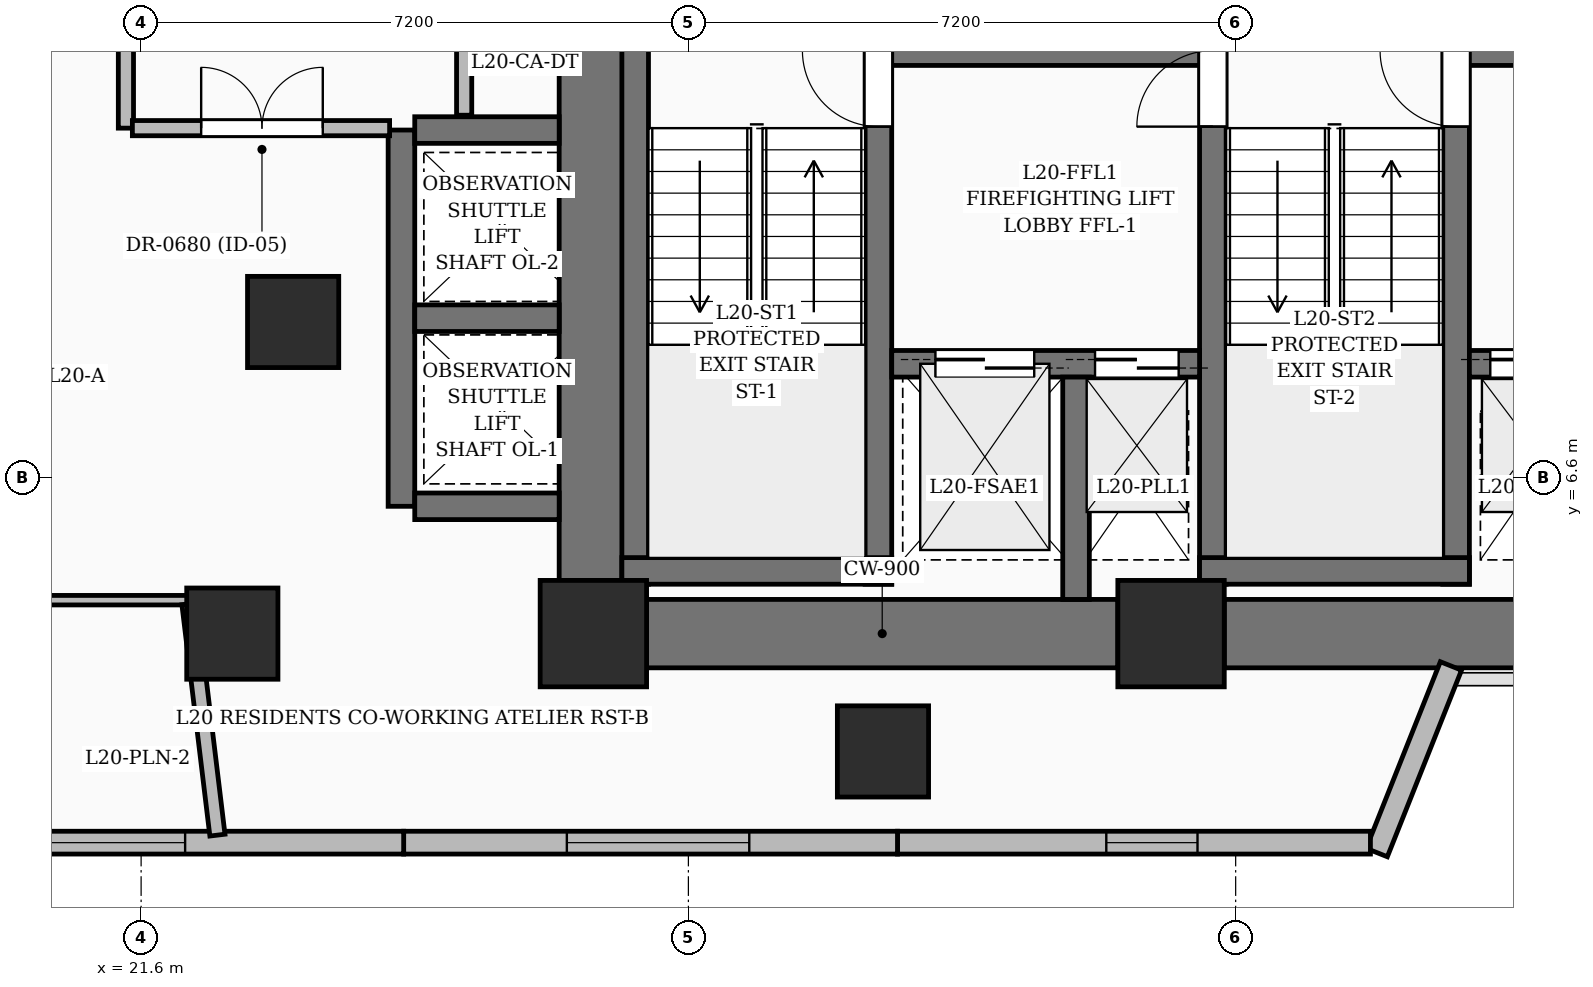
"""IFC4 building model, lengths in metres.
Left out: names, types, materials, properties, quantities, classifications, styles, units other than length and angle.
Written with IfcOpenShell. Run it as: python <this file> out.ifc"""

import sys

from ifc_helpers import new_model, si_unit, direction, frame, frame_2d, origin, origin_2d, place, context, subcontext, project, spatial, rectangle, extrude, element, fill, save


model = new_model("IFC4")
c1 = context("Model", 3, precision=1e-05, world=origin(), true_north=direction((0.0, 1.0)))
c2 = subcontext(c1, "Body", "Model", "MODEL_VIEW")
j1 = project(units=[si_unit("LENGTHUNIT", "METRE"), si_unit("PLANEANGLEUNIT", "RADIAN")], contexts=[c1])
p1 = place(None, origin())
s1 = spatial("IfcSite", under=j1, at=p1, CompositionType="ELEMENT")
p2 = place(p1, origin())
s2 = spatial("IfcBuilding", under=s1, at=p2, CompositionType="ELEMENT")
p3 = place(p2, frame((0.0, 0.0, 82.2)))
s3 = spatial("IfcBuildingStorey", under=s2, at=p3, CompositionType="ELEMENT", Elevation=82.2)
for number, where, z_axis, x_axis in (
    (1, (27.55, 4.55, 0.0), (0.0, 0.0, 1.0), (1.0, 0.0, 0.0)),
    (2, (35.15, 4.55, 0.0), (0.0, 0.0, 1.0), (1.0, 0.0, 0.0)),
):
    element("IfcColumn", number, at=place(p3, frame(where, z_axis=z_axis, x_axis=x_axis)), inside=s3, PredefinedType="COLUMN", context=c2, shape_type="SweptSolid", body=[
        extrude(rectangle(XDim=1.4, YDim=1.4, at=origin_2d()), origin(), (0.0, 0.0, 1.0), 3.6),
    ])
for number, where, z_axis, x_axis in (
    (3, (22.8, 4.55, 0.0), (0.0, 0.0, 1.0), (1.0, 0.0, 0.0)),
    (4, (23.6, 8.65, 0.0), (0.0, 0.0, 1.0), (1.0, 0.0, 0.0)),
):
    element("IfcColumn", number, at=place(p3, frame(where, z_axis=z_axis, x_axis=x_axis)), inside=s3, PredefinedType="COLUMN", context=c2, shape_type="SweptSolid", body=[
        extrude(rectangle(XDim=1.2, YDim=1.2, at=origin_2d()), origin(), (0.0, 0.0, 1.0), 3.6),
    ])
p4 = place(p3, frame((28.25, 4.55, 0.0), z_axis=(0.0, 0.0, 1.0), x_axis=(1.0, 0.0, 0.0)))
e5 = element("IfcWall", 5, at=p4, inside=s3, PredefinedType="SHEAR", context=c2, shape_type="SweptSolid", body=[
    extrude(rectangle(XDim=6.2, YDim=0.9, at=frame_2d((3.1, 0.0))), origin(), (0.0, 0.0, 1.0), 3.6),
])
p5 = place(p3, frame((35.85, 4.55, 0.0), z_axis=(0.0, 0.0, 1.0), x_axis=(1.0, 0.0, 0.0)))
e6 = element("IfcWall", 6, at=p5, inside=s3, PredefinedType="SHEAR", context=c2, shape_type="SweptSolid", body=[
    extrude(rectangle(XDim=10.5, YDim=0.9, at=frame_2d((5.25, 0.0))), origin(), (0.0, 0.0, 1.0), 3.6),
])
p6 = place(p3, frame((27.55, 5.25, 0.0), z_axis=(0.0, 0.0, 1.0), x_axis=(0.0, 1.0, 0.0)))
e7 = element("IfcWall", 7, at=p6, inside=s3, PredefinedType="SHEAR", context=c2, shape_type="SweptSolid", body=[
    extrude(rectangle(XDim=8.8, YDim=0.9, at=frame_2d((4.4, 0.0))), origin(), (0.0, 0.0, 1.0), 3.6),
])
p7 = place(p3, frame((28.1, 5.2, 0.0), z_axis=(0.0, 0.0, 1.0), x_axis=(0.0, 1.0, 0.0)))
e8 = element("IfcWall", 8, at=p7, inside=s3, PredefinedType="SOLIDWALL", context=c2, shape_type="SweptSolid", body=[
    extrude(rectangle(XDim=9.1, YDim=0.35, at=frame_2d((4.55, 0.0))), origin(), (0.0, 0.0, 1.0), 3.6),
])
p8 = place(p3, frame((31.3, 5.2, 0.0), z_axis=(0.0, 0.0, 1.0), x_axis=(0.0, 1.0, 0.0)))
e9 = element("IfcWall", 9, at=p8, inside=s3, PredefinedType="SOLIDWALL", context=c2, shape_type="SweptSolid", body=[
    extrude(rectangle(XDim=9.1, YDim=0.35, at=frame_2d((4.55, 0.0))), origin(), (0.0, 0.0, 1.0), 3.6),
])
p9 = place(p8, frame((6.02, 0.0, 0.0)))
e10 = element("IfcOpeningElement", 10, at=p9, cuts=e9, PredefinedType="OPENING", context=c2, shape_type="SweptSolid", body=[
    extrude(rectangle(XDim=1.0, YDim=2.15, at=frame_2d((0.5, 1.075))), frame((0.0, 0.185, 0.0), z_axis=(0.0, -1.0, 0.0), x_axis=(1.0, 0.0, 0.0)), (0.0, 0.0, 1.0), 0.37),
])
p10 = place(p3, frame((27.925, 5.375, 0.0), z_axis=(0.0, 0.0, 1.0), x_axis=(1.0, 0.0, 0.0)))
e11 = element("IfcWall", 11, at=p10, inside=s3, PredefinedType="SOLIDWALL", context=c2, shape_type="SweptSolid", body=[
    extrude(rectangle(XDim=3.55, YDim=0.35, at=frame_2d((1.775, 0.0))), origin(), (0.0, 0.0, 1.0), 3.6),
])
p11 = place(p3, frame((35.7, 5.2, 0.0), z_axis=(0.0, 0.0, 1.0), x_axis=(0.0, 1.0, 0.0)))
e12 = element("IfcWall", 12, at=p11, inside=s3, PredefinedType="SOLIDWALL", context=c2, shape_type="SweptSolid", body=[
    extrude(rectangle(XDim=9.1, YDim=0.35, at=frame_2d((4.55, 0.0))), origin(), (0.0, 0.0, 1.0), 3.6),
])
p12 = place(p11, frame((6.02, 0.0, 0.0)))
e13 = element("IfcOpeningElement", 13, at=p12, cuts=e12, PredefinedType="OPENING", context=c2, shape_type="SweptSolid", body=[
    extrude(rectangle(XDim=1.0, YDim=2.15, at=frame_2d((0.5, 1.075))), frame((0.0, 0.185, 0.0), z_axis=(0.0, -1.0, 0.0), x_axis=(1.0, 0.0, 0.0)), (0.0, 0.0, 1.0), 0.37),
])
p13 = place(p3, frame((38.9, 5.2, 0.0), z_axis=(0.0, 0.0, 1.0), x_axis=(0.0, 1.0, 0.0)))
e14 = element("IfcWall", 14, at=p13, inside=s3, PredefinedType="SOLIDWALL", context=c2, shape_type="SweptSolid", body=[
    extrude(rectangle(XDim=9.1, YDim=0.35, at=frame_2d((4.55, 0.0))), origin(), (0.0, 0.0, 1.0), 3.6),
])
p14 = place(p13, frame((6.02, 0.0, 0.0)))
e15 = element("IfcOpeningElement", 15, at=p14, cuts=e14, PredefinedType="OPENING", context=c2, shape_type="SweptSolid", body=[
    extrude(rectangle(XDim=1.0, YDim=2.15, at=frame_2d((0.5, 1.075))), frame((0.0, 0.185, 0.0), z_axis=(0.0, -1.0, 0.0), x_axis=(1.0, 0.0, 0.0)), (0.0, 0.0, 1.0), 0.37),
])
p15 = place(p3, frame((35.525, 5.375, 0.0), z_axis=(0.0, 0.0, 1.0), x_axis=(1.0, 0.0, 0.0)))
e16 = element("IfcWall", 16, at=p15, inside=s3, PredefinedType="SOLIDWALL", context=c2, shape_type="SweptSolid", body=[
    extrude(rectangle(XDim=3.55, YDim=0.35, at=frame_2d((1.775, 0.0))), origin(), (0.0, 0.0, 1.0), 3.6),
])
p16 = place(p3, frame((31.475, 8.1, 0.0), z_axis=(0.0, 0.0, 1.0), x_axis=(1.0, 0.0, 0.0)))
e17 = element("IfcWall", 17, at=p16, inside=s3, PredefinedType="SOLIDWALL", context=c2, shape_type="SweptSolid", body=[
    extrude(rectangle(XDim=4.05, YDim=0.35, at=frame_2d((2.025, 0.0))), origin(), (0.0, 0.0, 1.0), 3.6),
])
p17 = place(p16, frame((0.575, 0.0, 0.0)))
e18 = element("IfcOpeningElement", 18, at=p17, cuts=e17, PredefinedType="OPENING", context=c2, shape_type="SweptSolid", body=[
    extrude(rectangle(XDim=1.3, YDim=2.25, at=frame_2d((0.65, 1.125))), frame((0.0, 0.185, 0.0), z_axis=(0.0, -1.0, 0.0), x_axis=(1.0, 0.0, 0.0)), (0.0, 0.0, 1.0), 0.37),
])
p18 = place(p16, frame((2.675, 0.0, 0.0)))
e19 = element("IfcOpeningElement", 19, at=p18, cuts=e17, PredefinedType="OPENING", context=c2, shape_type="SweptSolid", body=[
    extrude(rectangle(XDim=1.1, YDim=2.2, at=frame_2d((0.55, 1.1))), frame((0.0, 0.185, 0.0), z_axis=(0.0, -1.0, 0.0), x_axis=(1.0, 0.0, 0.0)), (0.0, 0.0, 1.0), 0.37),
])
p19 = place(p3, frame((39.075, 8.1, 0.0), z_axis=(0.0, 0.0, 1.0), x_axis=(1.0, 0.0, 0.0)))
e20 = element("IfcWall", 20, at=p19, inside=s3, PredefinedType="SOLIDWALL", context=c2, shape_type="SweptSolid", body=[
    extrude(rectangle(XDim=4.05, YDim=0.35, at=frame_2d((2.025, 0.0))), origin(), (0.0, 0.0, 1.0), 3.6),
])
p20 = place(p19, frame((2.175, 0.0, 0.0)))
e21 = element("IfcOpeningElement", 21, at=p20, cuts=e20, PredefinedType="OPENING", context=c2, shape_type="SweptSolid", body=[
    extrude(rectangle(XDim=1.3, YDim=2.25, at=frame_2d((0.65, 1.125))), frame((0.0, 0.185, 0.0), z_axis=(0.0, -1.0, 0.0), x_axis=(1.0, 0.0, 0.0)), (0.0, 0.0, 1.0), 0.37),
])
p21 = place(p19, frame((0.275, 0.0, 0.0)))
e22 = element("IfcOpeningElement", 22, at=p21, cuts=e20, PredefinedType="OPENING", context=c2, shape_type="SweptSolid", body=[
    extrude(rectangle(XDim=1.1, YDim=2.2, at=frame_2d((0.55, 1.1))), frame((0.0, 0.185, 0.0), z_axis=(0.0, -1.0, 0.0), x_axis=(1.0, 0.0, 0.0)), (0.0, 0.0, 1.0), 0.37),
])
p22 = place(p3, frame((33.9, 5.0, 0.0), z_axis=(0.0, 0.0, 1.0), x_axis=(0.0, 1.0, 0.0)))
e23 = element("IfcWall", 23, at=p22, inside=s3, PredefinedType="SOLIDWALL", context=c2, shape_type="SweptSolid", body=[
    extrude(rectangle(XDim=2.925, YDim=0.35, at=frame_2d((1.462, 0.0))), origin(), (0.0, 0.0, 1.0), 3.6),
])
p23 = place(p3, frame((31.475, 12.2, 0.0), z_axis=(0.0, 0.0, 1.0), x_axis=(1.0, 0.0, 0.0)))
e24 = element("IfcWall", 24, at=p23, inside=s3, PredefinedType="SOLIDWALL", context=c2, shape_type="SweptSolid", body=[
    extrude(rectangle(XDim=4.05, YDim=0.35, at=frame_2d((2.025, 0.0))), origin(), (0.0, 0.0, 1.0), 3.6),
])
p24 = place(p3, frame((39.075, 12.2, 0.0), z_axis=(0.0, 0.0, 1.0), x_axis=(1.0, 0.0, 0.0)))
e25 = element("IfcWall", 25, at=p24, inside=s3, PredefinedType="SOLIDWALL", context=c2, shape_type="SweptSolid", body=[
    extrude(rectangle(XDim=4.05, YDim=0.35, at=frame_2d((2.025, 0.0))), origin(), (0.0, 0.0, 1.0), 3.6),
])
p25 = place(p3, frame((25.025, 6.225, 0.0), z_axis=(0.0, 0.0, 1.0), x_axis=(0.0, 1.0, 0.0)))
e26 = element("IfcWall", 26, at=p25, inside=s3, PredefinedType="SOLIDWALL", context=c2, shape_type="SweptSolid", body=[
    extrude(rectangle(XDim=4.95, YDim=0.35, at=frame_2d((2.475, 0.0))), origin(), (0.0, 0.0, 1.0), 3.6),
])
for number, where, z_axis, x_axis in (
    (27, (25.2, 6.225, 0.0), (0.0, 0.0, 1.0), (1.0, 0.0, 0.0)),
    (28, (25.2, 8.7, 0.0), (0.0, 0.0, 1.0), (1.0, 0.0, 0.0)),
    (29, (25.2, 11.175, 0.0), (0.0, 0.0, 1.0), (1.0, 0.0, 0.0)),
):
    element("IfcWall", number, at=place(p3, frame(where, z_axis=z_axis, x_axis=x_axis)), inside=s3, PredefinedType="SOLIDWALL", context=c2, shape_type="SweptSolid", body=[
        extrude(rectangle(XDim=1.9, YDim=0.35, at=frame_2d((0.95, 0.0))), origin(), (0.0, 0.0, 1.0), 3.6),
    ])
p26 = place(p3, frame((31.36, 3.0, 0.0), z_axis=(0.0, 0.0, 1.0), x_axis=(1.0, 0.0, 0.0)))
e30 = element("IfcColumn", 30, at=p26, inside=s3, PredefinedType="COLUMN", context=c2, shape_type="SweptSolid", body=[
    extrude(rectangle(XDim=1.2, YDim=1.2, at=origin_2d()), origin(), (0.0, 0.0, 1.0), 3.6),
])
p27 = place(p3, frame((38.833, 4.125, 0.0), z_axis=(0.0, 0.0, 1.0), x_axis=(-0.369557636099, -0.929207809696, 0.0)))
e31 = element("IfcWall", 31, at=p27, inside=s3, PredefinedType="SOLIDWALL", context=c2, shape_type="SweptSolid", body=[
    extrude(rectangle(XDim=2.642, YDim=0.3, at=frame_2d((1.321, 0.0))), origin(), (0.0, 0.0, 1.0), 2.35),
])
p28 = place(p3, frame((37.773, 1.8, 0.0), z_axis=(0.0, 0.0, 1.0), x_axis=(-1.0, 0.0, 0.0)))
e32 = element("IfcWall", 32, at=p28, inside=s3, PredefinedType="SOLIDWALL", context=c2, shape_type="SweptSolid", body=[
    extrude(rectangle(XDim=6.222, YDim=0.3, at=frame_2d((3.111, 0.0))), origin(), (0.0, 0.0, 1.0), 3.35),
])
p29 = place(p28, frame((2.275, 0.0, 0.8)))
e33 = element("IfcOpeningElement", 33, at=p29, cuts=e32, PredefinedType="OPENING", context=c2, shape_type="SweptSolid", body=[
    extrude(rectangle(XDim=1.2, YDim=1.8, at=frame_2d((0.6, 0.9))), frame((0.0, 0.16, 0.0), z_axis=(0.0, -1.0, 0.0), x_axis=(1.0, 0.0, 0.0)), (0.0, 0.0, 1.0), 0.32),
])
p30 = place(p3, frame((31.551, 1.8, 0.0), z_axis=(0.0, 0.0, 1.0), x_axis=(-1.0, 0.0, 0.0)))
e34 = element("IfcWall", 34, at=p30, inside=s3, PredefinedType="SOLIDWALL", context=c2, shape_type="SweptSolid", body=[
    extrude(rectangle(XDim=6.497, YDim=0.3, at=frame_2d((3.249, 0.0))), origin(), (0.0, 0.0, 1.0), 3.35),
])
p31 = place(p30, frame((1.95, 0.0, 0.6)))
e35 = element("IfcOpeningElement", 35, at=p31, cuts=e34, PredefinedType="OPENING", context=c2, shape_type="SweptSolid", body=[
    extrude(rectangle(XDim=2.4, YDim=2.1, at=frame_2d((1.2, 1.05))), frame((0.0, 0.16, 0.0), z_axis=(0.0, -1.0, 0.0), x_axis=(1.0, 0.0, 0.0)), (0.0, 0.0, 1.0), 0.32),
])
p32 = place(p3, frame((25.054, 1.8, 0.0), z_axis=(0.0, 0.0, 1.0), x_axis=(-1.0, 0.0, 0.0)))
e36 = element("IfcWall", 36, at=p32, inside=s3, PredefinedType="SOLIDWALL", context=c2, shape_type="SweptSolid", body=[
    extrude(rectangle(XDim=6.497, YDim=0.3, at=frame_2d((3.249, 0.0))), origin(), (0.0, 0.0, 1.0), 3.35),
])
p33 = place(p32, frame((2.875, 0.0, 0.6)))
e37 = element("IfcOpeningElement", 37, at=p33, cuts=e36, PredefinedType="OPENING", context=c2, shape_type="SweptSolid", body=[
    extrude(rectangle(XDim=1.8, YDim=2.1, at=frame_2d((0.9, 1.05))), frame((0.0, 0.16, 0.0), z_axis=(0.0, -1.0, 0.0), x_axis=(1.0, 0.0, 0.0)), (0.0, 0.0, 1.0), 0.32),
])
p34 = place(p3, frame((25.85, 11.37, 0.0), z_axis=(0.0, 0.0, 1.0), x_axis=(0.0, 1.0, 0.0)))
e38 = element("IfcWall", 38, at=p34, inside=s3, PredefinedType="PARTITIONING", context=c2, shape_type="SweptSolid", body=[
    extrude(rectangle(XDim=3.34, YDim=0.2, at=frame_2d((1.67, 0.0))), origin(), (0.0, 0.0, 1.0), 3.35),
])
p35 = place(p34, frame((1.9, 0.0, 0.0)))
e39 = element("IfcOpeningElement", 39, at=p35, cuts=e38, PredefinedType="OPENING", context=c2, shape_type="SweptSolid", body=[
    extrude(rectangle(XDim=0.9, YDim=2.1, at=frame_2d((0.45, 1.05))), frame((0.0, 0.11, 0.0), z_axis=(0.0, -1.0, 0.0), x_axis=(1.0, 0.0, 0.0)), (0.0, 0.0, 1.0), 0.22),
])
p36 = place(p3, frame((21.4, 15.0, 0.0), z_axis=(0.0, 0.0, 1.0), x_axis=(0.0, -1.0, 0.0)))
e40 = element("IfcWall", 40, at=p36, inside=s3, PredefinedType="PARTITIONING", context=c2, shape_type="SweptSolid", body=[
    extrude(rectangle(XDim=3.8, YDim=0.2, at=frame_2d((1.9, 0.0))), origin(), (0.0, 0.0, 1.0), 2.709),
])
p37 = place(p36, frame((1.262, 0.0, 0.0)))
e41 = element("IfcOpeningElement", 41, at=p37, cuts=e40, PredefinedType="OPENING", context=c2, shape_type="SweptSolid", body=[
    extrude(rectangle(XDim=1.0, YDim=2.2, at=frame_2d((0.5, 1.1))), frame((0.0, 0.11, 0.0), z_axis=(0.0, -1.0, 0.0), x_axis=(1.0, 0.0, 0.0)), (0.0, 0.0, 1.0), 0.22),
])
p38 = place(p3, frame((21.485, 11.2, 0.0), z_axis=(0.0, 0.0, 1.0), x_axis=(1.0, 0.0, 0.0)))
e42 = element("IfcWall", 42, at=p38, inside=s3, PredefinedType="PARTITIONING", context=c2, shape_type="SweptSolid", body=[
    extrude(rectangle(XDim=3.384, YDim=0.2, at=frame_2d((1.692, 0.0))), origin(), (0.0, 0.0, 1.0), 3.35),
])
p39 = place(p38, frame((0.905, 0.0, 0.0)))
e43 = element("IfcOpeningElement", 43, at=p39, cuts=e42, PredefinedType="OPENING", context=c2, shape_type="SweptSolid", body=[
    extrude(rectangle(XDim=1.6, YDim=2.3, at=frame_2d((0.8, 1.15))), frame((0.0, 0.11, 0.0), z_axis=(0.0, -1.0, 0.0), x_axis=(1.0, 0.0, 0.0)), (0.0, 0.0, 1.0), 0.22),
])
p40 = place(p3, frame((20.11, 4.99, 0.0), z_axis=(0.0, 0.0, 1.0), x_axis=(1.0, 0.0, 0.0)))
e44 = element("IfcWall", 44, at=p40, inside=s3, PredefinedType="PARTITIONING", context=c2, shape_type="SweptSolid", body=[
    extrude(rectangle(XDim=2.12, YDim=0.125, at=frame_2d((1.06, 0.0))), origin(), (0.0, 0.0, 1.0), 2.709),
])
p41 = place(p3, frame((21.34, 15.1, 0.0), z_axis=(0.0, 0.0, 1.0), x_axis=(-0.706759638276, -0.707453753756, 0.0)))
e45 = element("IfcWall", 45, at=p41, inside=s3, PredefinedType="PARTITIONING", context=c2, shape_type="SweptSolid", body=[
    extrude(rectangle(XDim=13.014, YDim=0.2, at=frame_2d((6.507, 0.0))), origin(), (0.0, 0.0, 1.0), 2.345),
])
p42 = place(p3, frame((22.604, 1.899, 0.0), z_axis=(0.0, 0.0, 1.0), x_axis=(-0.120074545748, 0.992764878238, 0.0)))
e46 = element("IfcWall", 46, at=p42, inside=s3, PredefinedType="PARTITIONING", context=c2, shape_type="SweptSolid", body=[
    extrude(rectangle(XDim=3.066, YDim=0.2, at=frame_2d((1.533, 0.0))), origin(), (0.0, 0.0, 1.0), 2.345),
])
p43 = place(p29, origin())
e47 = element("IfcWindow", 47, at=p43, inside=s3, PartitioningType="SINGLE_PANEL", PredefinedType="WINDOW", context=c2, shape_type="SweptSolid", body=[
    extrude(rectangle(XDim=1.2, YDim=1.8, at=frame_2d((0.6, 0.9))), frame((0.0, 0.03, 0.0), z_axis=(0.0, -1.0, 0.0), x_axis=(1.0, 0.0, 0.0)), (0.0, 0.0, 1.0), 0.06),
])
fill(e33, e47)
p44 = place(p31, origin())
e48 = element("IfcWindow", 48, at=p44, inside=s3, PartitioningType="SINGLE_PANEL", PredefinedType="WINDOW", context=c2, shape_type="SweptSolid", body=[
    extrude(rectangle(XDim=2.4, YDim=2.1, at=frame_2d((1.2, 1.05))), frame((0.0, 0.03, 0.0), z_axis=(0.0, -1.0, 0.0), x_axis=(1.0, 0.0, 0.0)), (0.0, 0.0, 1.0), 0.06),
])
fill(e35, e48)
p45 = place(p33, origin())
e49 = element("IfcWindow", 49, at=p45, inside=s3, PartitioningType="SINGLE_PANEL", PredefinedType="WINDOW", context=c2, shape_type="SweptSolid", body=[
    extrude(rectangle(XDim=1.8, YDim=2.1, at=frame_2d((0.9, 1.05))), frame((0.0, 0.03, 0.0), z_axis=(0.0, -1.0, 0.0), x_axis=(1.0, 0.0, 0.0)), (0.0, 0.0, 1.0), 0.06),
])
fill(e37, e49)
p46 = place(p9, origin())
e50 = element("IfcDoor", 50, at=p46, inside=s3, OperationType="SINGLE_SWING_RIGHT", PredefinedType="DOOR", context=c2, shape_type="SweptSolid", body=[
    extrude(rectangle(XDim=1.0, YDim=2.15, at=frame_2d((0.5, 1.075))), frame((0.0, 0.025, 0.0), z_axis=(0.0, -1.0, 0.0), x_axis=(1.0, 0.0, 0.0)), (0.0, 0.0, 1.0), 0.05),
])
fill(e10, e50)
p47 = place(p12, origin())
e51 = element("IfcDoor", 51, at=p47, inside=s3, OperationType="SINGLE_SWING_LEFT", PredefinedType="DOOR", context=c2, shape_type="SweptSolid", body=[
    extrude(rectangle(XDim=1.0, YDim=2.15, at=frame_2d((0.5, 1.075))), frame((0.0, 0.025, 0.0), z_axis=(0.0, -1.0, 0.0), x_axis=(1.0, 0.0, 0.0)), (0.0, 0.0, 1.0), 0.05),
])
fill(e13, e51)
p48 = place(p14, origin())
e52 = element("IfcDoor", 52, at=p48, inside=s3, OperationType="SINGLE_SWING_RIGHT", PredefinedType="DOOR", context=c2, shape_type="SweptSolid", body=[
    extrude(rectangle(XDim=1.0, YDim=2.15, at=frame_2d((0.5, 1.075))), frame((0.0, 0.025, 0.0), z_axis=(0.0, -1.0, 0.0), x_axis=(1.0, 0.0, 0.0)), (0.0, 0.0, 1.0), 0.05),
])
fill(e15, e52)
p49 = place(p17, origin())
e53 = element("IfcDoor", 53, at=p49, inside=s3, OperationType="DOUBLE_DOOR_SLIDING", PredefinedType="DOOR", context=c2, shape_type="SweptSolid", body=[
    extrude(rectangle(XDim=1.3, YDim=2.25, at=frame_2d((0.65, 1.125))), frame((0.0, 0.025, 0.0), z_axis=(0.0, -1.0, 0.0), x_axis=(1.0, 0.0, 0.0)), (0.0, 0.0, 1.0), 0.05),
])
fill(e18, e53)
p50 = place(p18, origin())
e54 = element("IfcDoor", 54, at=p50, inside=s3, OperationType="DOUBLE_DOOR_SLIDING", PredefinedType="DOOR", context=c2, shape_type="SweptSolid", body=[
    extrude(rectangle(XDim=1.1, YDim=2.2, at=frame_2d((0.55, 1.1))), frame((0.0, 0.025, 0.0), z_axis=(0.0, -1.0, 0.0), x_axis=(1.0, 0.0, 0.0)), (0.0, 0.0, 1.0), 0.05),
])
fill(e19, e54)
p51 = place(p21, origin())
e55 = element("IfcDoor", 55, at=p51, inside=s3, OperationType="DOUBLE_DOOR_SLIDING", PredefinedType="DOOR", context=c2, shape_type="SweptSolid", body=[
    extrude(rectangle(XDim=1.1, YDim=2.2, at=frame_2d((0.55, 1.1))), frame((0.0, 0.025, 0.0), z_axis=(0.0, -1.0, 0.0), x_axis=(1.0, 0.0, 0.0)), (0.0, 0.0, 1.0), 0.05),
])
fill(e22, e55)
p52 = place(p39, origin())
e56 = element("IfcDoor", 56, at=p52, inside=s3, OperationType="DOUBLE_DOOR_SINGLE_SWING", PredefinedType="DOOR", context=c2, shape_type="SweptSolid", body=[
    extrude(rectangle(XDim=1.6, YDim=2.3, at=frame_2d((0.8, 1.15))), frame((0.0, 0.025, 0.0), z_axis=(0.0, -1.0, 0.0), x_axis=(1.0, 0.0, 0.0)), (0.0, 0.0, 1.0), 0.05),
])
fill(e43, e56)
save(model, sys.argv[1])
